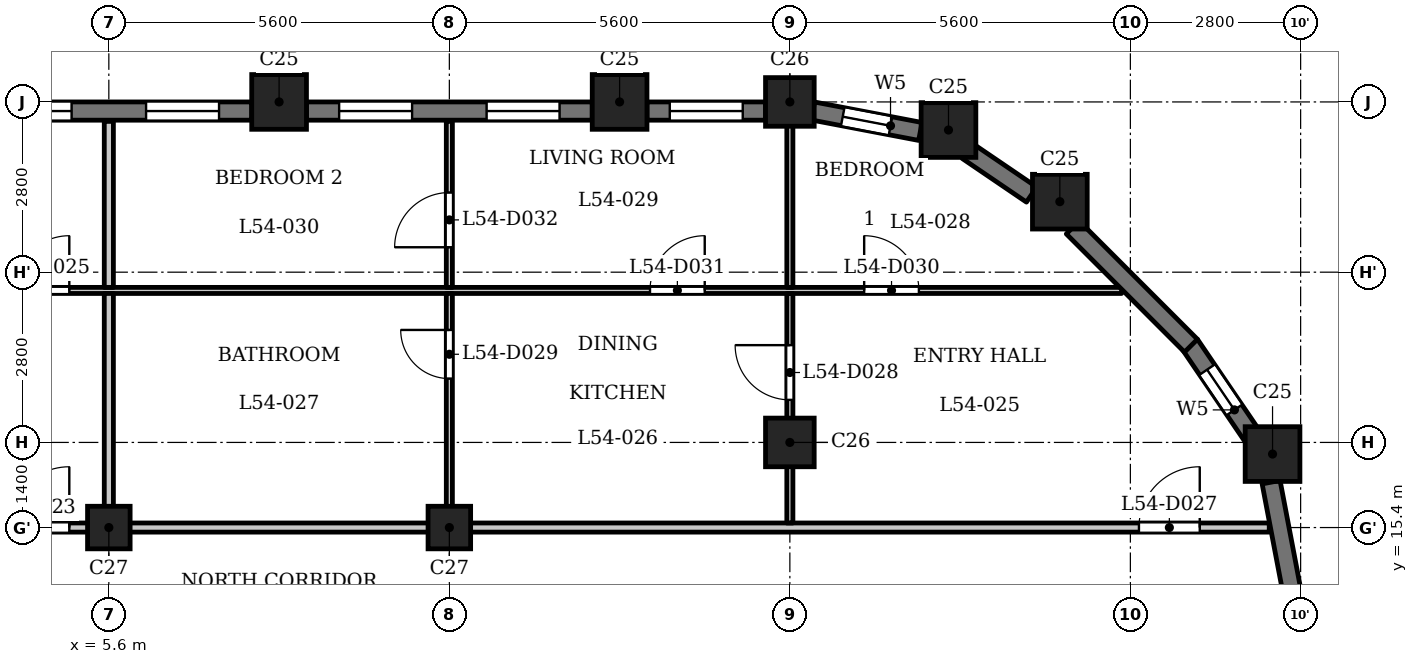
"""IFC4 building model, lengths in metres.
Left out: names, types, materials, properties, quantities, classifications, styles, units other than length and angle.
Written with IfcOpenShell. Run it as: python <this file> out.ifc"""

import sys

from ifc_helpers import new_model, si_unit, direction, frame, frame_2d, origin, origin_2d, place, context, subcontext, project, spatial, rectangle, extrude, element, fill, save


model = new_model("IFC4")
c1 = context("Model", 3, precision=1e-05, world=origin(), true_north=direction((0.0, 1.0)))
c2 = subcontext(c1, "Body", "Model", "MODEL_VIEW")
j1 = project(units=[si_unit("LENGTHUNIT", "METRE"), si_unit("PLANEANGLEUNIT", "RADIAN")], contexts=[c1])
p1 = place(None, origin())
s1 = spatial("IfcSite", under=j1, at=p1, CompositionType="ELEMENT")
p2 = place(p1, origin())
s2 = spatial("IfcBuilding", under=s1, at=p2, CompositionType="ELEMENT")
p3 = place(p2, frame((0.0, 0.0, 209.9)))
s3 = spatial("IfcBuildingStorey", under=s2, at=p3, CompositionType="ELEMENT", Elevation=209.9)
for number, where, z_axis, x_axis in (
    (1, (24.738, 16.609, 0.0), (0.0, 0.0, 1.0), (1.0, 0.0, 0.0)),
    (2, (21.24, 20.76, 0.0), (0.0, 0.0, 1.0), (1.0, 0.0, 0.0)),
    (3, (19.409, 21.938, 0.0), (0.0, 0.0, 1.0), (1.0, 0.0, 0.0)),
    (4, (14.0, 22.4, 0.0), (0.0, 0.0, 1.0), (1.0, 0.0, 0.0)),
    (5, (8.4, 22.4, 0.0), (0.0, 0.0, 1.0), (1.0, 0.0, 0.0)),
):
    element("IfcColumn", number, at=place(p3, frame(where, z_axis=z_axis, x_axis=x_axis)), inside=s3, PredefinedType="COLUMN", context=c2, shape_type="SweptSolid", body=[
        extrude(rectangle(XDim=0.9, YDim=0.9, at=origin_2d()), origin(), (0.0, 0.0, 1.0), 3.5),
    ])
for number, where, z_axis, x_axis in (
    (6, (16.8, 16.8, 0.0), (0.0, 0.0, 1.0), (1.0, 0.0, 0.0)),
    (7, (16.8, 22.4, 0.0), (0.0, 0.0, 1.0), (1.0, 0.0, 0.0)),
):
    element("IfcColumn", number, at=place(p3, frame(where, z_axis=z_axis, x_axis=x_axis)), inside=s3, PredefinedType="COLUMN", context=c2, shape_type="SweptSolid", body=[
        extrude(rectangle(XDim=0.8, YDim=0.8, at=origin_2d()), origin(), (0.0, 0.0, 1.0), 3.5),
    ])
for number, where, z_axis, x_axis in (
    (8, (5.6, 15.4, 0.0), (0.0, 0.0, 1.0), (1.0, 0.0, 0.0)),
    (9, (11.2, 15.4, 0.0), (0.0, 0.0, 1.0), (1.0, 0.0, 0.0)),
):
    element("IfcColumn", number, at=place(p3, frame(where, z_axis=z_axis, x_axis=x_axis)), inside=s3, PredefinedType="COLUMN", context=c2, shape_type="SweptSolid", body=[
        extrude(rectangle(XDim=0.7, YDim=0.7, at=origin_2d()), origin(), (0.0, 0.0, 1.0), 3.5),
    ])
p4 = place(p3, frame((25.053, 14.372, 0.0), z_axis=(0.0, 0.0, 1.0), x_axis=(-0.187348135549, 0.982293579388, 0.0)))
e10 = element("IfcWall", 10, at=p4, inside=s3, PredefinedType="SOLIDWALL", context=c2, shape_type="SweptSolid", body=[
    extrude(rectangle(XDim=1.806, YDim=0.3, at=frame_2d((0.903, 0.0))), origin(), (0.0, 0.0, 1.0), 2.5),
])
p5 = place(p3, frame((24.394, 16.919, 0.0), z_axis=(0.0, 0.0, 1.0), x_axis=(-0.562040093569, 0.827109988588, 0.0)))
e11 = element("IfcWall", 11, at=p5, inside=s3, PredefinedType="SOLIDWALL", context=c2, shape_type="SweptSolid", body=[
    extrude(rectangle(XDim=1.806, YDim=0.3, at=frame_2d((0.903, 0.0))), origin(), (0.0, 0.0, 1.0), 2.5),
])
p6 = place(p5, frame((0.503, 0.0, 0.6)))
e12 = element("IfcOpeningElement", 12, at=p6, cuts=e11, PredefinedType="OPENING", context=c2, shape_type="SweptSolid", body=[
    extrude(rectangle(XDim=0.8, YDim=1.55, at=frame_2d((0.4, 0.775))), frame((0.0, 0.16, 0.0), z_axis=(0.0, -1.0, 0.0), x_axis=(1.0, 0.0, 0.0)), (0.0, 0.0, 1.0), 0.32),
])
p7 = place(p3, frame((23.397, 18.391, 0.0), z_axis=(0.0, 0.0, 1.0), x_axis=(-0.707106781187, 0.707106781187, 0.0)))
e13 = element("IfcWall", 13, at=p7, inside=s3, PredefinedType="SOLIDWALL", context=c2, shape_type="SweptSolid", body=[
    extrude(rectangle(XDim=2.75, YDim=0.3, at=frame_2d((1.375, 0.0))), origin(), (0.0, 0.0, 1.0), 2.5),
])
p8 = place(p3, frame((20.775, 20.876, 0.0), z_axis=(0.0, 0.0, 1.0), x_axis=(-0.827075824828, 0.562090366388, 0.0)))
e14 = element("IfcWall", 14, at=p8, inside=s3, PredefinedType="SOLIDWALL", context=c2, shape_type="SweptSolid", body=[
    extrude(rectangle(XDim=1.277, YDim=0.3, at=frame_2d((0.638, 0.0))), origin(), (0.0, 0.0, 1.0), 2.5),
])
p9 = place(p3, frame((18.946, 21.914, 0.0), z_axis=(0.0, 0.0, 1.0), x_axis=(-0.98230529033, 0.187286722942, 0.0)))
e15 = element("IfcWall", 15, at=p9, inside=s3, PredefinedType="SOLIDWALL", context=c2, shape_type="SweptSolid", body=[
    extrude(rectangle(XDim=1.799, YDim=0.3, at=frame_2d((0.899, 0.0))), origin(), (0.0, 0.0, 1.0), 2.5),
])
p10 = place(p9, frame((0.5, 0.0, 0.6)))
e16 = element("IfcOpeningElement", 16, at=p10, cuts=e15, PredefinedType="OPENING", context=c2, shape_type="SweptSolid", body=[
    extrude(rectangle(XDim=0.8, YDim=1.55, at=frame_2d((0.4, 0.775))), frame((0.0, 0.16, 0.0), z_axis=(0.0, -1.0, 0.0), x_axis=(1.0, 0.0, 0.0)), (0.0, 0.0, 1.0), 0.32),
])
p11 = place(p3, frame((16.4, 22.25, 0.0), z_axis=(0.0, 0.0, 1.0), x_axis=(-1.0, 0.0, 0.0)))
e17 = element("IfcWall", 17, at=p11, inside=s3, PredefinedType="SOLIDWALL", context=c2, shape_type="SweptSolid", body=[
    extrude(rectangle(XDim=1.95, YDim=0.3, at=frame_2d((0.975, 0.0))), origin(), (0.0, 0.0, 1.0), 2.5),
])
p12 = place(p11, frame((0.375, 0.0, 0.6)))
e18 = element("IfcOpeningElement", 18, at=p12, cuts=e17, PredefinedType="OPENING", context=c2, shape_type="SweptSolid", body=[
    extrude(rectangle(XDim=1.2, YDim=1.55, at=frame_2d((0.6, 0.775))), frame((0.0, 0.16, 0.0), z_axis=(0.0, -1.0, 0.0), x_axis=(1.0, 0.0, 0.0)), (0.0, 0.0, 1.0), 0.32),
])
p13 = place(p3, frame((13.55, 22.25, 0.0), z_axis=(0.0, 0.0, 1.0), x_axis=(-1.0, 0.0, 0.0)))
e19 = element("IfcWall", 19, at=p13, inside=s3, PredefinedType="SOLIDWALL", context=c2, shape_type="SweptSolid", body=[
    extrude(rectangle(XDim=4.7, YDim=0.3, at=frame_2d((2.35, 0.0))), origin(), (0.0, 0.0, 1.0), 2.5),
])
p14 = place(p13, frame((0.538, 0.0, 0.6)))
e20 = element("IfcOpeningElement", 20, at=p14, cuts=e19, PredefinedType="OPENING", context=c2, shape_type="SweptSolid", body=[
    extrude(rectangle(XDim=1.2, YDim=1.55, at=frame_2d((0.6, 0.775))), frame((0.0, 0.16, 0.0), z_axis=(0.0, -1.0, 0.0), x_axis=(1.0, 0.0, 0.0)), (0.0, 0.0, 1.0), 0.32),
])
p15 = place(p13, frame((2.962, 0.0, 0.6)))
e21 = element("IfcOpeningElement", 21, at=p15, cuts=e19, PredefinedType="OPENING", context=c2, shape_type="SweptSolid", body=[
    extrude(rectangle(XDim=1.2, YDim=1.55, at=frame_2d((0.6, 0.775))), frame((0.0, 0.16, 0.0), z_axis=(0.0, -1.0, 0.0), x_axis=(1.0, 0.0, 0.0)), (0.0, 0.0, 1.0), 0.32),
])
p16 = place(p3, frame((7.95, 22.25, 0.0), z_axis=(0.0, 0.0, 1.0), x_axis=(-1.0, 0.0, 0.0)))
e22 = element("IfcWall", 22, at=p16, inside=s3, PredefinedType="SOLIDWALL", context=c2, shape_type="SweptSolid", body=[
    extrude(rectangle(XDim=4.7, YDim=0.3, at=frame_2d((2.35, 0.0))), origin(), (0.0, 0.0, 1.0), 2.5),
])
p17 = place(p16, frame((0.538, 0.0, 0.6)))
e23 = element("IfcOpeningElement", 23, at=p17, cuts=e22, PredefinedType="OPENING", context=c2, shape_type="SweptSolid", body=[
    extrude(rectangle(XDim=1.2, YDim=1.55, at=frame_2d((0.6, 0.775))), frame((0.0, 0.16, 0.0), z_axis=(0.0, -1.0, 0.0), x_axis=(1.0, 0.0, 0.0)), (0.0, 0.0, 1.0), 0.32),
])
p18 = place(p16, frame((2.962, 0.0, 0.6)))
e24 = element("IfcOpeningElement", 24, at=p18, cuts=e22, PredefinedType="OPENING", context=c2, shape_type="SweptSolid", body=[
    extrude(rectangle(XDim=1.2, YDim=1.55, at=frame_2d((0.6, 0.775))), frame((0.0, 0.16, 0.0), z_axis=(0.0, -1.0, 0.0), x_axis=(1.0, 0.0, 0.0)), (0.0, 0.0, 1.0), 0.32),
])
p19 = place(p3, frame((-24.684, 15.4, 0.0), z_axis=(0.0, 0.0, 1.0), x_axis=(1.0, 0.0, 0.0)))
e25 = element("IfcWall", 25, at=p19, inside=s3, PredefinedType="PARTITIONING", context=c2, shape_type="SweptSolid", body=[
    extrude(rectangle(XDim=49.368, YDim=0.15, at=frame_2d((24.684, 0.0))), origin(), (0.0, 0.0, 1.0), 3.2),
])
p20 = place(p19, frame((17.434, 0.0, 0.0)))
e26 = element("IfcOpeningElement", 26, at=p20, cuts=e25, PredefinedType="OPENING", context=c2, shape_type="SweptSolid", body=[
    extrude(rectangle(XDim=1.0, YDim=2.1, at=frame_2d((0.5, 1.05))), frame((0.0, 0.085, 0.0), z_axis=(0.0, -1.0, 0.0), x_axis=(1.0, 0.0, 0.0)), (0.0, 0.0, 1.0), 0.17),
])
p21 = place(p19, frame((28.634, 0.0, 0.0)))
e27 = element("IfcOpeningElement", 27, at=p21, cuts=e25, PredefinedType="OPENING", context=c2, shape_type="SweptSolid", body=[
    extrude(rectangle(XDim=1.0, YDim=2.1, at=frame_2d((0.5, 1.05))), frame((0.0, 0.085, 0.0), z_axis=(0.0, -1.0, 0.0), x_axis=(1.0, 0.0, 0.0)), (0.0, 0.0, 1.0), 0.17),
])
p22 = place(p19, frame((47.225, 0.0, 0.0)))
e28 = element("IfcOpeningElement", 28, at=p22, cuts=e25, PredefinedType="OPENING", context=c2, shape_type="SweptSolid", body=[
    extrude(rectangle(XDim=1.0, YDim=2.1, at=frame_2d((0.5, 1.05))), frame((0.0, 0.085, 0.0), z_axis=(0.0, -1.0, 0.0), x_axis=(1.0, 0.0, 0.0)), (0.0, 0.0, 1.0), 0.17),
])
p23 = place(p3, frame((-22.256, 19.3, 0.0), z_axis=(0.0, 0.0, 1.0), x_axis=(1.0, 0.0, 0.0)))
e29 = element("IfcWall", 29, at=p23, inside=s3, PredefinedType="PARTITIONING", context=c2, shape_type="SweptSolid", body=[
    extrude(rectangle(XDim=44.511, YDim=0.1, at=frame_2d((22.256, 0.0))), origin(), (0.0, 0.0, 1.0), 3.2),
])
p24 = place(p23, frame((11.606, 0.0, 0.0)))
e30 = element("IfcOpeningElement", 30, at=p24, cuts=e29, PredefinedType="OPENING", context=c2, shape_type="SweptSolid", body=[
    extrude(rectangle(XDim=0.9, YDim=2.1, at=frame_2d((0.45, 1.05))), frame((0.0, 0.06, 0.0), z_axis=(0.0, -1.0, 0.0), x_axis=(1.0, 0.0, 0.0)), (0.0, 0.0, 1.0), 0.12),
])
p25 = place(p23, frame((9.506, 0.0, 0.0)))
e31 = element("IfcOpeningElement", 31, at=p25, cuts=e29, PredefinedType="OPENING", context=c2, shape_type="SweptSolid", body=[
    extrude(rectangle(XDim=0.9, YDim=2.1, at=frame_2d((0.45, 1.05))), frame((0.0, 0.06, 0.0), z_axis=(0.0, -1.0, 0.0), x_axis=(1.0, 0.0, 0.0)), (0.0, 0.0, 1.0), 0.12),
])
p26 = place(p23, frame((20.806, 0.0, 0.0)))
e32 = element("IfcOpeningElement", 32, at=p26, cuts=e29, PredefinedType="OPENING", context=c2, shape_type="SweptSolid", body=[
    extrude(rectangle(XDim=0.8, YDim=2.1, at=frame_2d((0.4, 1.05))), frame((0.0, 0.06, 0.0), z_axis=(0.0, -1.0, 0.0), x_axis=(1.0, 0.0, 0.0)), (0.0, 0.0, 1.0), 0.12),
])
p27 = place(p23, frame((26.306, 0.0, 0.0)))
e33 = element("IfcOpeningElement", 33, at=p27, cuts=e29, PredefinedType="OPENING", context=c2, shape_type="SweptSolid", body=[
    extrude(rectangle(XDim=0.9, YDim=2.1, at=frame_2d((0.45, 1.05))), frame((0.0, 0.06, 0.0), z_axis=(0.0, -1.0, 0.0), x_axis=(1.0, 0.0, 0.0)), (0.0, 0.0, 1.0), 0.12),
])
p28 = place(p23, frame((40.278, 0.0, 0.0)))
e34 = element("IfcOpeningElement", 34, at=p28, cuts=e29, PredefinedType="OPENING", context=c2, shape_type="SweptSolid", body=[
    extrude(rectangle(XDim=0.9, YDim=2.1, at=frame_2d((0.45, 1.05))), frame((0.0, 0.06, 0.0), z_axis=(0.0, -1.0, 0.0), x_axis=(1.0, 0.0, 0.0)), (0.0, 0.0, 1.0), 0.12),
])
p29 = place(p23, frame((36.756, 0.0, 0.0)))
e35 = element("IfcOpeningElement", 35, at=p29, cuts=e29, PredefinedType="OPENING", context=c2, shape_type="SweptSolid", body=[
    extrude(rectangle(XDim=0.9, YDim=2.1, at=frame_2d((0.45, 1.05))), frame((0.0, 0.06, 0.0), z_axis=(0.0, -1.0, 0.0), x_axis=(1.0, 0.0, 0.0)), (0.0, 0.0, 1.0), 0.12),
])
p30 = place(p3, frame((5.6, 15.475, 0.0), z_axis=(0.0, 0.0, 1.0), x_axis=(0.0, 1.0, 0.0)))
e36 = element("IfcWall", 36, at=p30, inside=s3, PredefinedType="PARTITIONING", context=c2, shape_type="SweptSolid", body=[
    extrude(rectangle(XDim=3.775, YDim=0.15, at=frame_2d((1.887, 0.0))), origin(), (0.0, 0.0, 1.0), 3.2),
])
p31 = place(p3, frame((5.6, 19.35, 0.0), z_axis=(0.0, 0.0, 1.0), x_axis=(0.0, 1.0, 0.0)))
e37 = element("IfcWall", 37, at=p31, inside=s3, PredefinedType="PARTITIONING", context=c2, shape_type="SweptSolid", body=[
    extrude(rectangle(XDim=2.73, YDim=0.15, at=frame_2d((1.365, 0.0))), origin(), (0.0, 0.0, 1.0), 3.2),
])
p32 = place(p3, frame((11.2, 15.475, 0.0), z_axis=(0.0, 0.0, 1.0), x_axis=(0.0, 1.0, 0.0)))
e38 = element("IfcWall", 38, at=p32, inside=s3, PredefinedType="PARTITIONING", context=c2, shape_type="SweptSolid", body=[
    extrude(rectangle(XDim=3.775, YDim=0.1, at=frame_2d((1.887, 0.0))), origin(), (0.0, 0.0, 1.0), 3.2),
])
p33 = place(p32, frame((2.375, 0.0, 0.0)))
e39 = element("IfcOpeningElement", 39, at=p33, cuts=e38, PredefinedType="OPENING", context=c2, shape_type="SweptSolid", body=[
    extrude(rectangle(XDim=0.8, YDim=2.1, at=frame_2d((0.4, 1.05))), frame((0.0, 0.06, 0.0), z_axis=(0.0, -1.0, 0.0), x_axis=(1.0, 0.0, 0.0)), (0.0, 0.0, 1.0), 0.12),
])
p34 = place(p3, frame((11.2, 19.35, 0.0), z_axis=(0.0, 0.0, 1.0), x_axis=(0.0, 1.0, 0.0)))
e40 = element("IfcWall", 40, at=p34, inside=s3, PredefinedType="PARTITIONING", context=c2, shape_type="SweptSolid", body=[
    extrude(rectangle(XDim=2.73, YDim=0.1, at=frame_2d((1.365, 0.0))), origin(), (0.0, 0.0, 1.0), 3.2),
])
p35 = place(p34, frame((0.66, 0.0, 0.0)))
e41 = element("IfcOpeningElement", 41, at=p35, cuts=e40, PredefinedType="OPENING", context=c2, shape_type="SweptSolid", body=[
    extrude(rectangle(XDim=0.9, YDim=2.1, at=frame_2d((0.45, 1.05))), frame((0.0, 0.06, 0.0), z_axis=(0.0, -1.0, 0.0), x_axis=(1.0, 0.0, 0.0)), (0.0, 0.0, 1.0), 0.12),
])
p36 = place(p3, frame((16.8, 15.475, 0.0), z_axis=(0.0, 0.0, 1.0), x_axis=(0.0, 1.0, 0.0)))
e42 = element("IfcWall", 42, at=p36, inside=s3, PredefinedType="PARTITIONING", context=c2, shape_type="SweptSolid", body=[
    extrude(rectangle(XDim=3.775, YDim=0.1, at=frame_2d((1.887, 0.0))), origin(), (0.0, 0.0, 1.0), 2.55),
])
p37 = place(p36, frame((2.025, 0.0, 0.0)))
e43 = element("IfcOpeningElement", 43, at=p37, cuts=e42, PredefinedType="OPENING", context=c2, shape_type="SweptSolid", body=[
    extrude(rectangle(XDim=0.9, YDim=2.1, at=frame_2d((0.45, 1.05))), frame((0.0, 0.06, 0.0), z_axis=(0.0, -1.0, 0.0), x_axis=(1.0, 0.0, 0.0)), (0.0, 0.0, 1.0), 0.12),
])
p38 = place(p3, frame((16.8, 19.35, 0.0), z_axis=(0.0, 0.0, 1.0), x_axis=(0.0, 1.0, 0.0)))
e44 = element("IfcWall", 44, at=p38, inside=s3, PredefinedType="PARTITIONING", context=c2, shape_type="SweptSolid", body=[
    extrude(rectangle(XDim=2.96, YDim=0.1, at=frame_2d((1.48, 0.0))), origin(), (0.0, 0.0, 1.0), 2.55),
])
p39 = place(p21, origin())
e45 = element("IfcDoor", 45, at=p39, inside=s3, OperationType="SINGLE_SWING_LEFT", PredefinedType="DOOR", context=c2, shape_type="SweptSolid", body=[
    extrude(rectangle(XDim=1.0, YDim=2.1, at=frame_2d((0.5, 1.05))), frame((0.0, 0.025, 0.0), z_axis=(0.0, -1.0, 0.0), x_axis=(1.0, 0.0, 0.0)), (0.0, 0.0, 1.0), 0.05),
])
fill(e27, e45)
p40 = place(p27, origin())
e46 = element("IfcDoor", 46, at=p40, inside=s3, OperationType="SINGLE_SWING_LEFT", PredefinedType="DOOR", context=c2, shape_type="SweptSolid", body=[
    extrude(rectangle(XDim=0.9, YDim=2.1, at=frame_2d((0.45, 1.05))), frame((0.0, 0.025, 0.0), z_axis=(0.0, -1.0, 0.0), x_axis=(1.0, 0.0, 0.0)), (0.0, 0.0, 1.0), 0.05),
])
fill(e33, e46)
p41 = place(p22, origin())
e47 = element("IfcDoor", 47, at=p41, inside=s3, OperationType="SINGLE_SWING_LEFT", PredefinedType="DOOR", context=c2, shape_type="SweptSolid", body=[
    extrude(rectangle(XDim=1.0, YDim=2.1, at=frame_2d((0.5, 1.05))), frame((0.0, 0.025, 0.0), z_axis=(0.0, -1.0, 0.0), x_axis=(1.0, 0.0, 0.0)), (0.0, 0.0, 1.0), 0.05),
])
fill(e28, e47)
p42 = place(p37, origin())
e48 = element("IfcDoor", 48, at=p42, inside=s3, OperationType="SINGLE_SWING_LEFT", PredefinedType="DOOR", context=c2, shape_type="SweptSolid", body=[
    extrude(rectangle(XDim=0.9, YDim=2.1, at=frame_2d((0.45, 1.05))), frame((0.0, 0.025, 0.0), z_axis=(0.0, -1.0, 0.0), x_axis=(1.0, 0.0, 0.0)), (0.0, 0.0, 1.0), 0.05),
])
fill(e43, e48)
p43 = place(p33, origin())
e49 = element("IfcDoor", 49, at=p43, inside=s3, OperationType="SINGLE_SWING_LEFT", PredefinedType="DOOR", context=c2, shape_type="SweptSolid", body=[
    extrude(rectangle(XDim=0.8, YDim=2.1, at=frame_2d((0.4, 1.05))), frame((0.0, 0.025, 0.0), z_axis=(0.0, -1.0, 0.0), x_axis=(1.0, 0.0, 0.0)), (0.0, 0.0, 1.0), 0.05),
])
fill(e39, e49)
p44 = place(p28, origin())
e50 = element("IfcDoor", 50, at=p44, inside=s3, OperationType="SINGLE_SWING_RIGHT", PredefinedType="DOOR", context=c2, shape_type="SweptSolid", body=[
    extrude(rectangle(XDim=0.9, YDim=2.1, at=frame_2d((0.45, 1.05))), frame((0.0, 0.025, 0.0), z_axis=(0.0, -1.0, 0.0), x_axis=(1.0, 0.0, 0.0)), (0.0, 0.0, 1.0), 0.05),
])
fill(e34, e50)
p45 = place(p29, origin())
e51 = element("IfcDoor", 51, at=p45, inside=s3, OperationType="SINGLE_SWING_LEFT", PredefinedType="DOOR", context=c2, shape_type="SweptSolid", body=[
    extrude(rectangle(XDim=0.9, YDim=2.1, at=frame_2d((0.45, 1.05))), frame((0.0, 0.025, 0.0), z_axis=(0.0, -1.0, 0.0), x_axis=(1.0, 0.0, 0.0)), (0.0, 0.0, 1.0), 0.05),
])
fill(e35, e51)
p46 = place(p35, origin())
e52 = element("IfcDoor", 52, at=p46, inside=s3, OperationType="SINGLE_SWING_RIGHT", PredefinedType="DOOR", context=c2, shape_type="SweptSolid", body=[
    extrude(rectangle(XDim=0.9, YDim=2.1, at=frame_2d((0.45, 1.05))), frame((0.0, 0.025, 0.0), z_axis=(0.0, -1.0, 0.0), x_axis=(1.0, 0.0, 0.0)), (0.0, 0.0, 1.0), 0.05),
])
fill(e41, e52)
p47 = place(p6, origin())
e53 = element("IfcWindow", 53, at=p47, inside=s3, PartitioningType="SINGLE_PANEL", PredefinedType="WINDOW", context=c2, shape_type="SweptSolid", body=[
    extrude(rectangle(XDim=0.8, YDim=1.55, at=frame_2d((0.4, 0.775))), frame((0.0, 0.03, 0.0), z_axis=(0.0, -1.0, 0.0), x_axis=(1.0, 0.0, 0.0)), (0.0, 0.0, 1.0), 0.06),
])
fill(e12, e53)
p48 = place(p10, origin())
e54 = element("IfcWindow", 54, at=p48, inside=s3, PartitioningType="SINGLE_PANEL", PredefinedType="WINDOW", context=c2, shape_type="SweptSolid", body=[
    extrude(rectangle(XDim=0.8, YDim=1.55, at=frame_2d((0.4, 0.775))), frame((0.0, 0.03, 0.0), z_axis=(0.0, -1.0, 0.0), x_axis=(1.0, 0.0, 0.0)), (0.0, 0.0, 1.0), 0.06),
])
fill(e16, e54)
p49 = place(p12, origin())
e55 = element("IfcWindow", 55, at=p49, inside=s3, PartitioningType="SINGLE_PANEL", PredefinedType="WINDOW", context=c2, shape_type="SweptSolid", body=[
    extrude(rectangle(XDim=1.2, YDim=1.55, at=frame_2d((0.6, 0.775))), frame((0.0, 0.03, 0.0), z_axis=(0.0, -1.0, 0.0), x_axis=(1.0, 0.0, 0.0)), (0.0, 0.0, 1.0), 0.06),
])
fill(e18, e55)
p50 = place(p14, origin())
e56 = element("IfcWindow", 56, at=p50, inside=s3, PartitioningType="SINGLE_PANEL", PredefinedType="WINDOW", context=c2, shape_type="SweptSolid", body=[
    extrude(rectangle(XDim=1.2, YDim=1.55, at=frame_2d((0.6, 0.775))), frame((0.0, 0.03, 0.0), z_axis=(0.0, -1.0, 0.0), x_axis=(1.0, 0.0, 0.0)), (0.0, 0.0, 1.0), 0.06),
])
fill(e20, e56)
p51 = place(p15, origin())
e57 = element("IfcWindow", 57, at=p51, inside=s3, PartitioningType="SINGLE_PANEL", PredefinedType="WINDOW", context=c2, shape_type="SweptSolid", body=[
    extrude(rectangle(XDim=1.2, YDim=1.55, at=frame_2d((0.6, 0.775))), frame((0.0, 0.03, 0.0), z_axis=(0.0, -1.0, 0.0), x_axis=(1.0, 0.0, 0.0)), (0.0, 0.0, 1.0), 0.06),
])
fill(e21, e57)
p52 = place(p17, origin())
e58 = element("IfcWindow", 58, at=p52, inside=s3, PartitioningType="SINGLE_PANEL", PredefinedType="WINDOW", context=c2, shape_type="SweptSolid", body=[
    extrude(rectangle(XDim=1.2, YDim=1.55, at=frame_2d((0.6, 0.775))), frame((0.0, 0.03, 0.0), z_axis=(0.0, -1.0, 0.0), x_axis=(1.0, 0.0, 0.0)), (0.0, 0.0, 1.0), 0.06),
])
fill(e23, e58)
p53 = place(p18, origin())
e59 = element("IfcWindow", 59, at=p53, inside=s3, PartitioningType="SINGLE_PANEL", PredefinedType="WINDOW", context=c2, shape_type="SweptSolid", body=[
    extrude(rectangle(XDim=1.2, YDim=1.55, at=frame_2d((0.6, 0.775))), frame((0.0, 0.03, 0.0), z_axis=(0.0, -1.0, 0.0), x_axis=(1.0, 0.0, 0.0)), (0.0, 0.0, 1.0), 0.06),
])
fill(e24, e59)
save(model, sys.argv[1])
